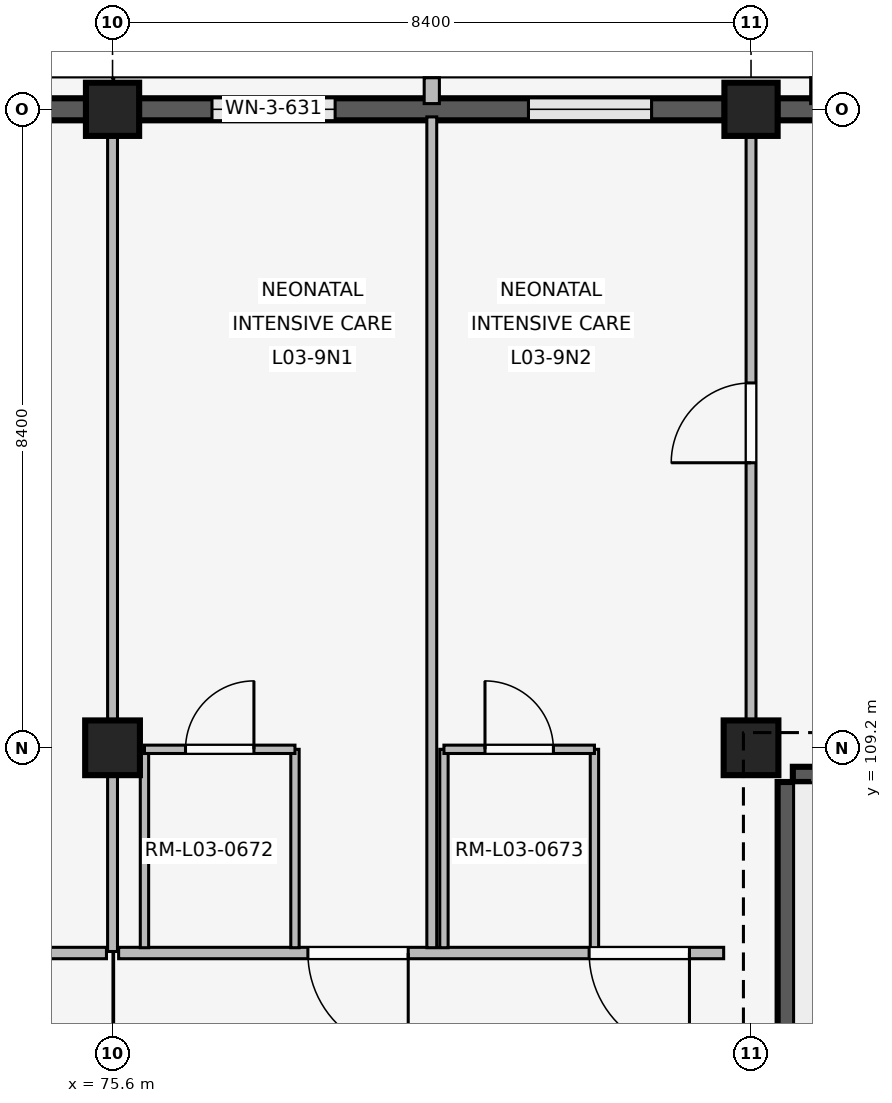
"""IFC4 building model, lengths in metres.
Left out: names, types, materials, properties, quantities, classifications, styles, units other than length and angle.
Written with IfcOpenShell. Run it as: python <this file> out.ifc"""

import sys

from ifc_helpers import new_model, si_unit, direction, frame, frame_2d, origin, origin_2d, place, context, subcontext, project, spatial, rectangle, extrude, element, fill, save


model = new_model("IFC4")
c1 = context("Model", 3, precision=1e-05, world=origin(), true_north=direction((0.0, 1.0)))
c2 = subcontext(c1, "Body", "Model", "MODEL_VIEW")
j1 = project(units=[si_unit("LENGTHUNIT", "METRE"), si_unit("PLANEANGLEUNIT", "RADIAN")], contexts=[c1])
p1 = place(None, origin())
s1 = spatial("IfcSite", under=j1, at=p1, CompositionType="ELEMENT")
p2 = place(p1, origin())
s2 = spatial("IfcBuilding", under=s1, at=p2, CompositionType="ELEMENT")
p3 = place(p2, frame((0.0, 0.0, 12.9)))
s3 = spatial("IfcBuildingStorey", under=s2, at=p3, CompositionType="ELEMENT", Elevation=12.9)
p4 = place(p3, frame((75.6, 109.2, 0.0), z_axis=(0.0, 0.0, 1.0), x_axis=(1.0, 0.0, 0.0)))
e1 = element("IfcColumn", 1, at=p4, inside=s3, PredefinedType="COLUMN", context=c2, shape_type="SweptSolid", body=[
    extrude(rectangle(XDim=0.72, YDim=0.72, at=origin_2d()), origin(), (0.0, 0.0, 1.0), 3.3),
])
p5 = place(p3, frame((75.6, 117.6, 0.0), z_axis=(0.0, 0.0, 1.0), x_axis=(1.0, 0.0, 0.0)))
e2 = element("IfcColumn", 2, at=p5, inside=s3, PredefinedType="COLUMN", context=c2, shape_type="SweptSolid", body=[
    extrude(rectangle(XDim=0.7, YDim=0.7, at=origin_2d()), origin(), (0.0, 0.0, 1.0), 3.3),
])
p6 = place(p3, frame((84.0, 109.2, 0.0), z_axis=(0.0, 0.0, 1.0), x_axis=(1.0, 0.0, 0.0)))
e3 = element("IfcColumn", 3, at=p6, inside=s3, PredefinedType="COLUMN", context=c2, shape_type="SweptSolid", body=[
    extrude(rectangle(XDim=0.72, YDim=0.72, at=origin_2d()), origin(), (0.0, 0.0, 1.0), 3.3),
])
p7 = place(p3, frame((84.0, 117.6, 0.0), z_axis=(0.0, 0.0, 1.0), x_axis=(1.0, 0.0, 0.0)))
e4 = element("IfcColumn", 4, at=p7, inside=s3, PredefinedType="COLUMN", context=c2, shape_type="SweptSolid", body=[
    extrude(rectangle(XDim=0.7, YDim=0.7, at=origin_2d()), origin(), (0.0, 0.0, 1.0), 3.3),
])
p8 = place(p3, frame((67.545, 117.6, 0.0), z_axis=(0.0, 0.0, 1.0), x_axis=(1.0, 0.0, 0.0)))
e5 = element("IfcWall", 5, at=p8, inside=s3, PredefinedType="SOLIDWALL", context=c2, shape_type="SweptSolid", body=[
    extrude(rectangle(XDim=7.71, YDim=0.29, at=frame_2d((3.855, 0.0))), origin(), (0.0, 0.0, 1.0), 2.44),
])
p9 = place(p8, frame((1.043, 0.0, 0.85)))
e6 = element("IfcOpeningElement", 6, at=p9, cuts=e5, PredefinedType="OPENING", context=c2, shape_type="SweptSolid", body=[
    extrude(rectangle(XDim=1.46, YDim=0.85, at=frame_2d((0.73, 0.425))), frame((0.0, 0.155, 0.0), z_axis=(0.0, -1.0, 0.0), x_axis=(1.0, 0.0, 0.0)), (0.0, 0.0, 1.0), 0.31),
])
p10 = place(p8, frame((5.207, 0.0, 0.85)))
e7 = element("IfcOpeningElement", 7, at=p10, cuts=e5, PredefinedType="OPENING", context=c2, shape_type="SweptSolid", body=[
    extrude(rectangle(XDim=1.46, YDim=0.85, at=frame_2d((0.73, 0.425))), frame((0.0, 0.155, 0.0), z_axis=(0.0, -1.0, 0.0), x_axis=(1.0, 0.0, 0.0)), (0.0, 0.0, 1.0), 0.31),
])
p11 = place(p3, frame((75.945, 117.6, 0.0), z_axis=(0.0, 0.0, 1.0), x_axis=(1.0, 0.0, 0.0)))
e8 = element("IfcWall", 8, at=p11, inside=s3, PredefinedType="SOLIDWALL", context=c2, shape_type="SweptSolid", body=[
    extrude(rectangle(XDim=7.71, YDim=0.29, at=frame_2d((3.855, 0.0))), origin(), (0.0, 0.0, 1.0), 2.44),
])
p12 = place(p11, frame((0.963, 0.0, 0.85)))
e9 = element("IfcOpeningElement", 9, at=p12, cuts=e8, PredefinedType="OPENING", context=c2, shape_type="SweptSolid", body=[
    extrude(rectangle(XDim=1.62, YDim=0.95, at=frame_2d((0.81, 0.475))), frame((0.0, 0.155, 0.0), z_axis=(0.0, -1.0, 0.0), x_axis=(1.0, 0.0, 0.0)), (0.0, 0.0, 1.0), 0.31),
])
p13 = place(p11, frame((5.127, 0.0, 0.85)))
e10 = element("IfcOpeningElement", 10, at=p13, cuts=e8, PredefinedType="OPENING", context=c2, shape_type="SweptSolid", body=[
    extrude(rectangle(XDim=1.62, YDim=0.95, at=frame_2d((0.81, 0.475))), frame((0.0, 0.155, 0.0), z_axis=(0.0, -1.0, 0.0), x_axis=(1.0, 0.0, 0.0)), (0.0, 0.0, 1.0), 0.31),
])
p14 = place(p3, frame((79.8, 117.675, 0.0), z_axis=(0.0, 0.0, 1.0), x_axis=(0.0, 1.0, 0.0)))
e11 = element("IfcWall", 11, at=p14, inside=s3, PredefinedType="ELEMENTEDWALL", context=c2, shape_type="SweptSolid", body=[
    extrude(rectangle(XDim=0.34, YDim=0.2, at=frame_2d((0.17, 0.0))), origin(), (0.0, 0.0, 1.0), 2.42),
])
p15 = place(p3, frame((84.345, 117.6, 0.0), z_axis=(0.0, 0.0, 1.0), x_axis=(1.0, 0.0, 0.0)))
e12 = element("IfcWall", 12, at=p15, inside=s3, PredefinedType="SOLIDWALL", context=c2, shape_type="SweptSolid", body=[
    extrude(rectangle(XDim=7.71, YDim=0.29, at=frame_2d((3.855, 0.0))), origin(), (0.0, 0.0, 1.0), 2.44),
])
p16 = place(p15, frame((1.043, 0.0, 0.85)))
e13 = element("IfcOpeningElement", 13, at=p16, cuts=e12, PredefinedType="OPENING", context=c2, shape_type="SweptSolid", body=[
    extrude(rectangle(XDim=1.46, YDim=0.85, at=frame_2d((0.73, 0.425))), frame((0.0, 0.155, 0.0), z_axis=(0.0, -1.0, 0.0), x_axis=(1.0, 0.0, 0.0)), (0.0, 0.0, 1.0), 0.31),
])
p17 = place(p15, frame((5.207, 0.0, 0.85)))
e14 = element("IfcOpeningElement", 14, at=p17, cuts=e12, PredefinedType="OPENING", context=c2, shape_type="SweptSolid", body=[
    extrude(rectangle(XDim=1.46, YDim=0.85, at=frame_2d((0.73, 0.425))), frame((0.0, 0.155, 0.0), z_axis=(0.0, -1.0, 0.0), x_axis=(1.0, 0.0, 0.0)), (0.0, 0.0, 1.0), 0.31),
])
p18 = place(p3, frame((84.885, 117.675, 0.0), z_axis=(0.0, 0.0, 1.0), x_axis=(0.0, 1.0, 0.0)))
e15 = element("IfcWall", 15, at=p18, inside=s3, PredefinedType="ELEMENTEDWALL", context=c2, shape_type="SweptSolid", body=[
    extrude(rectangle(XDim=0.34, YDim=0.2, at=frame_2d((0.17, 0.0))), origin(), (0.0, 0.0, 1.0), 2.42),
])
p19 = place(p3, frame((84.55, 108.75, 0.0), z_axis=(0.0, 0.0, 1.0), x_axis=(1.0, 0.0, 0.0)))
e16 = element("IfcWall", 16, at=p19, inside=s3, PredefinedType="SHEAR", context=c2, shape_type="SweptSolid", body=[
    extrude(rectangle(XDim=7.5, YDim=0.4, at=frame_2d((3.75, 0.0))), origin(), (0.0, 0.0, 1.0), 3.02),
])
p20 = place(p3, frame((84.55, 101.2, 0.0), z_axis=(0.0, 0.0, 1.0), x_axis=(0.0, 1.0, 0.0)))
e17 = element("IfcWall", 17, at=p20, inside=s3, PredefinedType="SHEAR", context=c2, shape_type="SweptSolid", body=[
    extrude(rectangle(XDim=7.55, YDim=0.4, at=frame_2d((3.775, 0.0))), origin(), (0.0, 0.0, 1.0), 3.02),
])
p21 = place(p20, frame((0.28, 0.0, 0.0)))
e18 = element("IfcOpeningElement", 18, at=p21, cuts=e17, PredefinedType="OPENING", context=c2, shape_type="SweptSolid", body=[
    extrude(rectangle(XDim=1.0, YDim=2.15, at=frame_2d((0.5, 1.075))), frame((0.0, 0.21, 0.0), z_axis=(0.0, -1.0, 0.0), x_axis=(1.0, 0.0, 0.0)), (0.0, 0.0, 1.0), 0.42),
])
p22 = place(p3, frame((75.52, 106.5, 0.0), z_axis=(0.0, 0.0, 1.0), x_axis=(-1.0, 0.0, 0.0)))
e19 = element("IfcWall", 19, at=p22, inside=s3, PredefinedType="PARTITIONING", context=c2, shape_type="SweptSolid", body=[
    extrude(rectangle(XDim=8.24, YDim=0.15, at=frame_2d((4.12, 0.0))), origin(), (0.0, 0.0, 1.0), 2.42),
])
p23 = place(p22, frame((3.495, 0.0, 0.0)))
e20 = element("IfcOpeningElement", 20, at=p23, cuts=e19, PredefinedType="OPENING", context=c2, shape_type="SweptSolid", body=[
    extrude(rectangle(XDim=1.25, YDim=2.2, at=frame_2d((0.625, 1.1))), frame((0.0, 0.085, 0.0), z_axis=(0.0, -1.0, 0.0), x_axis=(1.0, 0.0, 0.0)), (0.0, 0.0, 1.0), 0.17),
])
p24 = place(p3, frame((75.6, 106.52, 0.0), z_axis=(0.0, 0.0, 1.0), x_axis=(0.0, 1.0, 0.0)))
e21 = element("IfcWall", 21, at=p24, inside=s3, PredefinedType="PARTITIONING", context=c2, shape_type="SweptSolid", body=[
    extrude(rectangle(XDim=10.94, YDim=0.13, at=frame_2d((5.47, 0.0))), origin(), (0.0, 0.0, 1.0), 2.42),
])
p25 = place(p3, frame((83.64, 106.5, 0.0), z_axis=(0.0, 0.0, 1.0), x_axis=(-1.0, 0.0, 0.0)))
e22 = element("IfcWall", 22, at=p25, inside=s3, PredefinedType="PARTITIONING", context=c2, shape_type="SweptSolid", body=[
    extrude(rectangle(XDim=7.96, YDim=0.15, at=frame_2d((3.98, 0.0))), origin(), (0.0, 0.0, 1.0), 2.42),
])
p26 = place(p25, frame((0.45, 0.0, 0.0)))
e23 = element("IfcOpeningElement", 23, at=p26, cuts=e22, PredefinedType="OPENING", context=c2, shape_type="SweptSolid", body=[
    extrude(rectangle(XDim=1.32, YDim=2.25, at=frame_2d((0.66, 1.125))), frame((0.0, 0.085, 0.0), z_axis=(0.0, -1.0, 0.0), x_axis=(1.0, 0.0, 0.0)), (0.0, 0.0, 1.0), 0.17),
])
p27 = place(p25, frame((4.15, 0.0, 0.0)))
e24 = element("IfcOpeningElement", 24, at=p27, cuts=e22, PredefinedType="OPENING", context=c2, shape_type="SweptSolid", body=[
    extrude(rectangle(XDim=1.32, YDim=2.25, at=frame_2d((0.66, 1.125))), frame((0.0, 0.085, 0.0), z_axis=(0.0, -1.0, 0.0), x_axis=(1.0, 0.0, 0.0)), (0.0, 0.0, 1.0), 0.17),
])
p28 = place(p3, frame((79.8, 106.57, 0.0), z_axis=(0.0, 0.0, 1.0), x_axis=(0.0, 1.0, 0.0)))
e25 = element("IfcWall", 25, at=p28, inside=s3, PredefinedType="PARTITIONING", context=c2, shape_type="SweptSolid", body=[
    extrude(rectangle(XDim=10.93, YDim=0.13, at=frame_2d((5.465, 0.0))), origin(), (0.0, 0.0, 1.0), 2.42),
])
for number, where, z_axis, x_axis in (
    (26, (76.02, 106.57, 0.0), (0.0, 0.0, 1.0), (0.0, 1.0, 0.0)),
    (27, (78.0, 106.57, 0.0), (0.0, 0.0, 1.0), (0.0, 1.0, 0.0)),
):
    element("IfcWall", number, at=place(p3, frame(where, z_axis=z_axis, x_axis=x_axis)), inside=s3, PredefinedType="PARTITIONING", context=c2, shape_type="SweptSolid", body=[
        extrude(rectangle(XDim=2.61, YDim=0.11, at=frame_2d((1.305, 0.0))), origin(), (0.0, 0.0, 1.0), 2.42),
    ])
p29 = place(p3, frame((76.02, 109.18, 0.0), z_axis=(0.0, 0.0, 1.0), x_axis=(1.0, 0.0, 0.0)))
e28 = element("IfcWall", 28, at=p29, inside=s3, PredefinedType="PARTITIONING", context=c2, shape_type="SweptSolid", body=[
    extrude(rectangle(XDim=1.98, YDim=0.11, at=frame_2d((0.99, 0.0))), origin(), (0.0, 0.0, 1.0), 2.42),
])
p30 = place(p29, frame((0.54, 0.0, 0.0)))
e29 = element("IfcOpeningElement", 29, at=p30, cuts=e28, PredefinedType="OPENING", context=c2, shape_type="SweptSolid", body=[
    extrude(rectangle(XDim=0.9, YDim=2.1, at=frame_2d((0.45, 1.05))), frame((0.0, 0.065, 0.0), z_axis=(0.0, -1.0, 0.0), x_axis=(1.0, 0.0, 0.0)), (0.0, 0.0, 1.0), 0.13),
])
for number, where, z_axis, x_axis in (
    (30, (79.96, 106.57, 0.0), (0.0, 0.0, 1.0), (0.0, 1.0, 0.0)),
    (31, (81.94, 106.57, 0.0), (0.0, 0.0, 1.0), (0.0, 1.0, 0.0)),
):
    element("IfcWall", number, at=place(p3, frame(where, z_axis=z_axis, x_axis=x_axis)), inside=s3, PredefinedType="PARTITIONING", context=c2, shape_type="SweptSolid", body=[
        extrude(rectangle(XDim=2.61, YDim=0.11, at=frame_2d((1.305, 0.0))), origin(), (0.0, 0.0, 1.0), 2.42),
    ])
p31 = place(p3, frame((79.96, 109.18, 0.0), z_axis=(0.0, 0.0, 1.0), x_axis=(1.0, 0.0, 0.0)))
e32 = element("IfcWall", 32, at=p31, inside=s3, PredefinedType="PARTITIONING", context=c2, shape_type="SweptSolid", body=[
    extrude(rectangle(XDim=1.98, YDim=0.11, at=frame_2d((0.99, 0.0))), origin(), (0.0, 0.0, 1.0), 2.42),
])
p32 = place(p31, frame((0.54, 0.0, 0.0)))
e33 = element("IfcOpeningElement", 33, at=p32, cuts=e32, PredefinedType="OPENING", context=c2, shape_type="SweptSolid", body=[
    extrude(rectangle(XDim=0.9, YDim=2.1, at=frame_2d((0.45, 1.05))), frame((0.0, 0.065, 0.0), z_axis=(0.0, -1.0, 0.0), x_axis=(1.0, 0.0, 0.0)), (0.0, 0.0, 1.0), 0.13),
])
p33 = place(p3, frame((84.0, 109.55, 0.0), z_axis=(0.0, 0.0, 1.0), x_axis=(0.0, 1.0, 0.0)))
e34 = element("IfcWall", 34, at=p33, inside=s3, PredefinedType="PARTITIONING", context=c2, shape_type="SweptSolid", body=[
    extrude(rectangle(XDim=7.91, YDim=0.13, at=frame_2d((3.955, 0.0))), origin(), (0.0, 0.0, 1.0), 2.42),
])
p34 = place(p33, frame((3.4, 0.0, 0.0)))
e35 = element("IfcOpeningElement", 35, at=p34, cuts=e34, PredefinedType="OPENING", context=c2, shape_type="SweptSolid", body=[
    extrude(rectangle(XDim=1.05, YDim=2.2, at=frame_2d((0.525, 1.1))), frame((0.0, 0.075, 0.0), z_axis=(0.0, -1.0, 0.0), x_axis=(1.0, 0.0, 0.0)), (0.0, 0.0, 1.0), 0.15),
])
p35 = place(p12, origin())
e36 = element("IfcWindow", 36, at=p35, inside=s3, PartitioningType="SINGLE_PANEL", PredefinedType="WINDOW", context=c2, shape_type="SweptSolid", body=[
    extrude(rectangle(XDim=1.62, YDim=0.95, at=frame_2d((0.81, 0.475))), frame((0.0, 0.03, 0.0), z_axis=(0.0, -1.0, 0.0), x_axis=(1.0, 0.0, 0.0)), (0.0, 0.0, 1.0), 0.06),
])
fill(e9, e36)
p36 = place(p13, origin())
e37 = element("IfcWindow", 37, at=p36, inside=s3, PartitioningType="SINGLE_PANEL", PredefinedType="WINDOW", context=c2, shape_type="SweptSolid", body=[
    extrude(rectangle(XDim=1.62, YDim=0.95, at=frame_2d((0.81, 0.475))), frame((0.0, 0.03, 0.0), z_axis=(0.0, -1.0, 0.0), x_axis=(1.0, 0.0, 0.0)), (0.0, 0.0, 1.0), 0.06),
])
fill(e10, e37)
p37 = place(p26, origin())
e38 = element("IfcDoor", 38, at=p37, inside=s3, OperationType="SINGLE_SWING_LEFT", PredefinedType="DOOR", context=c2, shape_type="SweptSolid", body=[
    extrude(rectangle(XDim=1.32, YDim=2.25, at=frame_2d((0.66, 1.125))), frame((0.0, 0.025, 0.0), z_axis=(0.0, -1.0, 0.0), x_axis=(1.0, 0.0, 0.0)), (0.0, 0.0, 1.0), 0.05),
])
fill(e23, e38)
p38 = place(p27, origin())
e39 = element("IfcDoor", 39, at=p38, inside=s3, OperationType="SINGLE_SWING_LEFT", PredefinedType="DOOR", context=c2, shape_type="SweptSolid", body=[
    extrude(rectangle(XDim=1.32, YDim=2.25, at=frame_2d((0.66, 1.125))), frame((0.0, 0.025, 0.0), z_axis=(0.0, -1.0, 0.0), x_axis=(1.0, 0.0, 0.0)), (0.0, 0.0, 1.0), 0.05),
])
fill(e24, e39)
p39 = place(p30, origin())
e40 = element("IfcDoor", 40, at=p39, inside=s3, OperationType="SINGLE_SWING_RIGHT", PredefinedType="DOOR", context=c2, shape_type="SweptSolid", body=[
    extrude(rectangle(XDim=0.9, YDim=2.1, at=frame_2d((0.45, 1.05))), frame((0.0, 0.025, 0.0), z_axis=(0.0, -1.0, 0.0), x_axis=(1.0, 0.0, 0.0)), (0.0, 0.0, 1.0), 0.05),
])
fill(e29, e40)
p40 = place(p32, origin())
e41 = element("IfcDoor", 41, at=p40, inside=s3, OperationType="SINGLE_SWING_LEFT", PredefinedType="DOOR", context=c2, shape_type="SweptSolid", body=[
    extrude(rectangle(XDim=0.9, YDim=2.1, at=frame_2d((0.45, 1.05))), frame((0.0, 0.025, 0.0), z_axis=(0.0, -1.0, 0.0), x_axis=(1.0, 0.0, 0.0)), (0.0, 0.0, 1.0), 0.05),
])
fill(e33, e41)
p41 = place(p34, origin())
e42 = element("IfcDoor", 42, at=p41, inside=s3, OperationType="SINGLE_SWING_LEFT", PredefinedType="DOOR", context=c2, shape_type="SweptSolid", body=[
    extrude(rectangle(XDim=1.05, YDim=2.2, at=frame_2d((0.525, 1.1))), frame((0.0, 0.025, 0.0), z_axis=(0.0, -1.0, 0.0), x_axis=(1.0, 0.0, 0.0)), (0.0, 0.0, 1.0), 0.05),
])
fill(e35, e42)
save(model, sys.argv[1])
